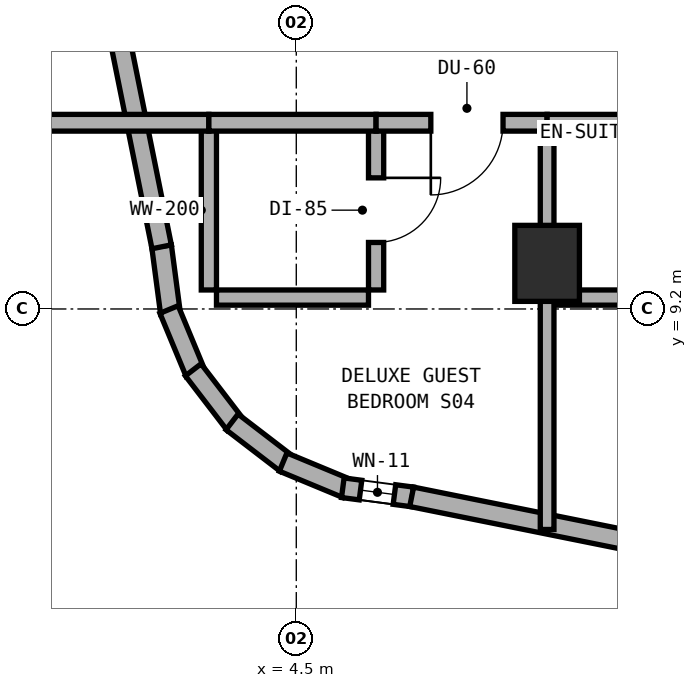
"""IFC4 building model, lengths in metres.
Left out: names, types, materials, properties, quantities, classifications, styles, units other than length and angle.
Written with IfcOpenShell. Run it as: python <this file> out.ifc"""

import sys

from ifc_helpers import new_model, si_unit, direction, frame, frame_2d, origin, origin_2d, place, context, subcontext, project, spatial, rectangle, extrude, element, fill, save


model = new_model("IFC4")
c1 = context("Model", 3, precision=1e-05, world=origin(), true_north=direction((0.0, 1.0)))
c2 = subcontext(c1, "Body", "Model", "MODEL_VIEW")
j1 = project(units=[si_unit("LENGTHUNIT", "METRE"), si_unit("PLANEANGLEUNIT", "RADIAN")], contexts=[c1])
p1 = place(None, origin())
s1 = spatial("IfcSite", under=j1, at=p1, CompositionType="ELEMENT")
p2 = place(p1, origin())
s2 = spatial("IfcBuilding", under=s1, at=p2, CompositionType="ELEMENT")
p3 = place(p2, frame((0.0, 0.0, 138.0)))
s3 = spatial("IfcBuildingStorey", under=s2, at=p3, CompositionType="ELEMENT", Elevation=138.0)
p4 = place(p3, frame((7.8, 9.8, 0.0), z_axis=(0.0, 0.0, 1.0), x_axis=(1.0, 0.0, 0.0)))
e1 = element("IfcColumn", 1, at=p4, inside=s3, PredefinedType="COLUMN", context=c2, shape_type="SweptSolid", body=[
    extrude(rectangle(XDim=0.85, YDim=1.0, at=origin_2d()), origin(), (0.0, 0.0, 1.0), 3.5),
])
p5 = place(p3, frame((2.728, 10.025, 0.0), z_axis=(0.0, 0.0, 1.0), x_axis=(0.130953706898, -0.991388484223, 0.0)))
e2 = element("IfcWall", 2, at=p5, inside=s3, PredefinedType="STANDARD", context=c2, shape_type="SweptSolid", body=[
    extrude(rectangle(XDim=0.885, YDim=0.26, at=frame_2d((0.443, 0.0))), origin(), (0.0, 0.0, 1.0), 3.22),
])
p6 = place(p3, frame((2.826, 9.193, 0.0), z_axis=(0.0, 0.0, 1.0), x_axis=(0.383290660547, -0.923627776508, 0.0)))
e3 = element("IfcWall", 3, at=p6, inside=s3, PredefinedType="STANDARD", context=c2, shape_type="SweptSolid", body=[
    extrude(rectangle(XDim=0.903, YDim=0.26, at=frame_2d((0.452, 0.0))), origin(), (0.0, 0.0, 1.0), 3.22),
])
p7 = place(p3, frame((3.144, 8.399, 0.0), z_axis=(0.0, 0.0, 1.0), x_axis=(0.608624690463, -0.793458244748, 0.0)))
e4 = element("IfcWall", 4, at=p7, inside=s3, PredefinedType="STANDARD", context=c2, shape_type="SweptSolid", body=[
    extrude(rectangle(XDim=0.902, YDim=0.26, at=frame_2d((0.451, 0.0))), origin(), (0.0, 0.0, 1.0), 3.22),
])
p8 = place(p3, frame((3.655, 7.714, 0.0), z_axis=(0.0, 0.0, 1.0), x_axis=(0.793558456666, -0.608494022858, 0.0)))
e5 = element("IfcWall", 5, at=p8, inside=s3, PredefinedType="STANDARD", context=c2, shape_type="SweptSolid", body=[
    extrude(rectangle(XDim=0.902, YDim=0.26, at=frame_2d((0.451, 0.0))), origin(), (0.0, 0.0, 1.0), 3.22),
])
p9 = place(p3, frame((4.327, 7.186, 0.0), z_axis=(0.0, 0.0, 1.0), x_axis=(0.923683767999, -0.383155708213, 0.0)))
e6 = element("IfcWall", 6, at=p9, inside=s3, PredefinedType="STANDARD", context=c2, shape_type="SweptSolid", body=[
    extrude(rectangle(XDim=0.903, YDim=0.26, at=frame_2d((0.451, 0.0))), origin(), (0.0, 0.0, 1.0), 3.22),
])
p10 = place(p3, frame((5.112, 6.848, 0.0), z_axis=(0.0, 0.0, 1.0), x_axis=(0.991487658083, -0.130200706103, 0.0)))
e7 = element("IfcWall", 7, at=p10, inside=s3, PredefinedType="STANDARD", context=c2, shape_type="SweptSolid", body=[
    extrude(rectangle(XDim=0.921, YDim=0.26, at=frame_2d((0.46, 0.0))), origin(), (0.0, 0.0, 1.0), 3.22),
])
p11 = place(p10, frame((0.235, 0.0, 0.85)))
e8 = element("IfcOpeningElement", 8, at=p11, cuts=e7, PredefinedType="OPENING", context=c2, shape_type="SweptSolid", body=[
    extrude(rectangle(XDim=0.45, YDim=1.5, at=frame_2d((0.225, 0.75))), frame((0.0, 0.14, 0.0), z_axis=(0.0, -1.0, 0.0), x_axis=(1.0, 0.0, 0.0)), (0.0, 0.0, 1.0), 0.28),
])
p12 = place(p3, frame((6.018, 6.729, 0.0), z_axis=(0.0, 0.0, 1.0), x_axis=(0.980315963543, -0.197435082048, 0.0)))
e9 = element("IfcWall", 9, at=p12, inside=s3, PredefinedType="STANDARD", context=c2, shape_type="SweptSolid", body=[
    extrude(rectangle(XDim=9.183, YDim=0.26, at=frame_2d((4.591, 0.0))), origin(), (0.0, 0.0, 1.0), 3.22),
])
p13 = place(p12, frame((4.487, 0.0, 0.85)))
e10 = element("IfcOpeningElement", 10, at=p13, cuts=e9, PredefinedType="OPENING", context=c2, shape_type="SweptSolid", body=[
    extrude(rectangle(XDim=2.1, YDim=1.5, at=frame_2d((1.05, 0.75))), frame((0.0, 0.14, 0.0), z_axis=(0.0, -1.0, 0.0), x_axis=(1.0, 0.0, 0.0)), (0.0, 0.0, 1.0), 0.28),
])
p14 = place(p3, frame((0.916, 19.02, 0.0), z_axis=(0.0, 0.0, 1.0), x_axis=(0.197435082048, -0.980315963543, 0.0)))
e11 = element("IfcWall", 11, at=p14, inside=s3, PredefinedType="STANDARD", context=c2, shape_type="SweptSolid", body=[
    extrude(rectangle(XDim=9.183, YDim=0.26, at=frame_2d((4.591, 0.0))), origin(), (0.0, 0.0, 1.0), 3.22),
])
p15 = place(p14, frame((2.647, 0.0, 0.85)))
e12 = element("IfcOpeningElement", 12, at=p15, cuts=e11, PredefinedType="OPENING", context=c2, shape_type="SweptSolid", body=[
    extrude(rectangle(XDim=2.1, YDim=1.5, at=frame_2d((1.05, 0.75))), frame((0.0, 0.14, 0.0), z_axis=(0.0, -1.0, 0.0), x_axis=(1.0, 0.0, 0.0)), (0.0, 0.0, 1.0), 0.28),
])
p16 = place(p3, frame((5.55, 9.45, 0.0), z_axis=(0.0, 0.0, 1.0), x_axis=(0.0, 1.0, 0.0)))
e13 = element("IfcWall", 13, at=p16, inside=s3, PredefinedType="PLUMBINGWALL", context=c2, shape_type="SweptSolid", body=[
    extrude(rectangle(XDim=2.1, YDim=0.2, at=frame_2d((1.05, 0.0))), origin(), (0.0, 0.0, 1.0), 3.22),
])
p17 = place(p16, frame((0.625, 0.0, 0.0)))
e14 = element("IfcOpeningElement", 14, at=p17, cuts=e13, PredefinedType="OPENING", context=c2, shape_type="SweptSolid", body=[
    extrude(rectangle(XDim=0.85, YDim=2.1, at=frame_2d((0.425, 1.05))), frame((0.0, 0.11, 0.0), z_axis=(0.0, -1.0, 0.0), x_axis=(1.0, 0.0, 0.0)), (0.0, 0.0, 1.0), 0.22),
])
p18 = place(p3, frame((3.45, 9.35, 0.0), z_axis=(0.0, 0.0, 1.0), x_axis=(1.0, 0.0, 0.0)))
e15 = element("IfcWall", 15, at=p18, inside=s3, PredefinedType="PLUMBINGWALL", context=c2, shape_type="SweptSolid", body=[
    extrude(rectangle(XDim=2.0, YDim=0.2, at=frame_2d((1.0, 0.0))), origin(), (0.0, 0.0, 1.0), 3.22),
])
p19 = place(p3, frame((3.35, 9.45, 0.0), z_axis=(0.0, 0.0, 1.0), x_axis=(0.0, 1.0, 0.0)))
e16 = element("IfcWall", 16, at=p19, inside=s3, PredefinedType="PLUMBINGWALL", context=c2, shape_type="SweptSolid", body=[
    extrude(rectangle(XDim=2.1, YDim=0.2, at=frame_2d((1.05, 0.0))), origin(), (0.0, 0.0, 1.0), 3.22),
])
p20 = place(p3, frame((0.96, 11.65, 0.0), z_axis=(0.0, 0.0, 1.0), x_axis=(1.0, 0.0, 0.0)))
e17 = element("IfcWall", 17, at=p20, inside=s3, PredefinedType="SOLIDWALL", context=c2, shape_type="SweptSolid", body=[
    extrude(rectangle(XDim=2.39, YDim=0.22, at=frame_2d((1.195, 0.0))), origin(), (0.0, 0.0, 1.0), 3.22),
])
p21 = place(p3, frame((3.35, 11.65, 0.0), z_axis=(0.0, 0.0, 1.0), x_axis=(1.0, 0.0, 0.0)))
e18 = element("IfcWall", 18, at=p21, inside=s3, PredefinedType="SOLIDWALL", context=c2, shape_type="SweptSolid", body=[
    extrude(rectangle(XDim=2.2, YDim=0.22, at=frame_2d((1.1, 0.0))), origin(), (0.0, 0.0, 1.0), 3.22),
])
p22 = place(p3, frame((5.55, 11.65, 0.0), z_axis=(0.0, 0.0, 1.0), x_axis=(1.0, 0.0, 0.0)))
e19 = element("IfcWall", 19, at=p22, inside=s3, PredefinedType="SOLIDWALL", context=c2, shape_type="SweptSolid", body=[
    extrude(rectangle(XDim=2.25, YDim=0.22, at=frame_2d((1.125, 0.0))), origin(), (0.0, 0.0, 1.0), 2.695),
])
p23 = place(p22, frame((0.72, 0.0, 0.0)))
e20 = element("IfcOpeningElement", 20, at=p23, cuts=e19, PredefinedType="OPENING", context=c2, shape_type="SweptSolid", body=[
    extrude(rectangle(XDim=0.95, YDim=2.1, at=frame_2d((0.475, 1.05))), frame((0.0, 0.12, 0.0), z_axis=(0.0, -1.0, 0.0), x_axis=(1.0, 0.0, 0.0)), (0.0, 0.0, 1.0), 0.24),
])
p24 = place(p3, frame((7.8, 6.299, 0.0), z_axis=(0.0, 0.0, 1.0), x_axis=(0.0, 1.0, 0.0)))
e21 = element("IfcWall", 21, at=p24, inside=s3, PredefinedType="SOLIDWALL", context=c2, shape_type="SweptSolid", body=[
    extrude(rectangle(XDim=5.351, YDim=0.18, at=frame_2d((2.675, 0.0))), origin(), (0.0, 0.0, 1.0), 2.695),
])
p25 = place(p3, frame((7.9, 9.35, 0.0), z_axis=(0.0, 0.0, 1.0), x_axis=(1.0, 0.0, 0.0)))
e22 = element("IfcWall", 22, at=p25, inside=s3, PredefinedType="PLUMBINGWALL", context=c2, shape_type="SweptSolid", body=[
    extrude(rectangle(XDim=2.0, YDim=0.2, at=frame_2d((1.0, 0.0))), origin(), (0.0, 0.0, 1.0), 3.22),
])
p26 = place(p3, frame((7.8, 11.65, 0.0), z_axis=(0.0, 0.0, 1.0), x_axis=(1.0, 0.0, 0.0)))
e23 = element("IfcWall", 23, at=p26, inside=s3, PredefinedType="SOLIDWALL", context=c2, shape_type="SweptSolid", body=[
    extrude(rectangle(XDim=2.2, YDim=0.22, at=frame_2d((1.1, 0.0))), origin(), (0.0, 0.0, 1.0), 2.695),
])
p27 = place(p11, origin())
e24 = element("IfcWindow", 24, at=p27, inside=s3, PartitioningType="SINGLE_PANEL", PredefinedType="WINDOW", context=c2, shape_type="SweptSolid", body=[
    extrude(rectangle(XDim=0.45, YDim=1.5, at=frame_2d((0.225, 0.75))), frame((0.0, 0.03, 0.0), z_axis=(0.0, -1.0, 0.0), x_axis=(1.0, 0.0, 0.0)), (0.0, 0.0, 1.0), 0.06),
])
fill(e8, e24)
p28 = place(p17, frame((0.85, 0.0, 0.0), z_axis=(0.0, 0.0, 1.0), x_axis=(-1.0, 0.0, 0.0)))
e25 = element("IfcDoor", 25, at=p28, inside=s3, OperationType="SINGLE_SWING_LEFT", PredefinedType="DOOR", context=c2, shape_type="SweptSolid", body=[
    extrude(rectangle(XDim=0.85, YDim=2.1, at=frame_2d((0.425, 1.05))), frame((0.0, 0.025, 0.0), z_axis=(0.0, -1.0, 0.0), x_axis=(1.0, 0.0, 0.0)), (0.0, 0.0, 1.0), 0.05),
])
fill(e14, e25)
p29 = place(p23, frame((0.95, 0.0, 0.0), z_axis=(0.0, 0.0, 1.0), x_axis=(-1.0, 0.0, 0.0)))
e26 = element("IfcDoor", 26, at=p29, inside=s3, OperationType="SINGLE_SWING_RIGHT", PredefinedType="DOOR", context=c2, shape_type="SweptSolid", body=[
    extrude(rectangle(XDim=0.95, YDim=2.1, at=frame_2d((0.475, 1.05))), frame((0.0, 0.025, 0.0), z_axis=(0.0, -1.0, 0.0), x_axis=(1.0, 0.0, 0.0)), (0.0, 0.0, 1.0), 0.05),
])
fill(e20, e26)
save(model, sys.argv[1])
